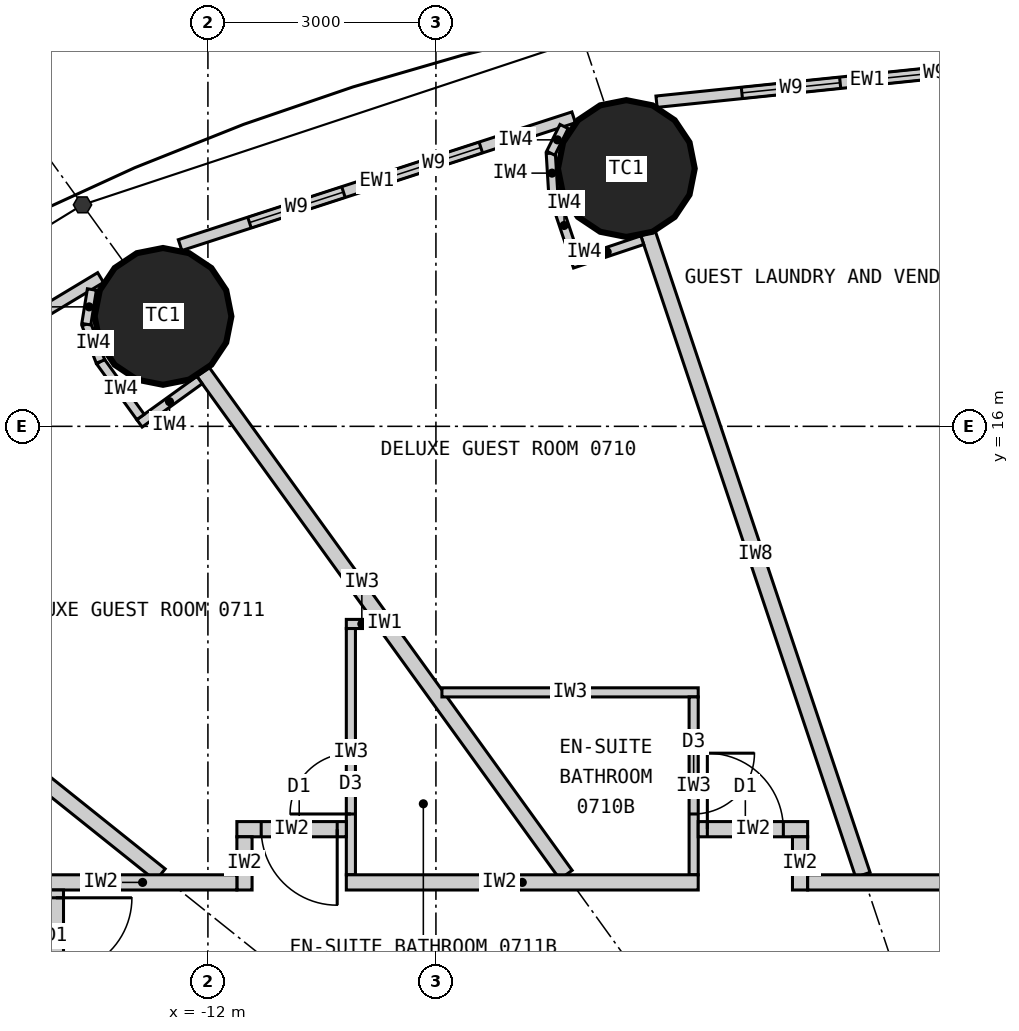
"""IFC4 building model, lengths in metres.
Left out: names, types, materials, properties, quantities, classifications, styles, units other than length and angle.
Written with IfcOpenShell. Run it as: python <this file> out.ifc"""

import sys

from ifc_helpers import new_model, si_unit, direction, frame, frame_2d, origin, origin_2d, place, context, subcontext, project, spatial, rectangle, circle, extrude, element, fill, save


model = new_model("IFC4")
c1 = context("Model", 3, precision=1e-05, world=origin(), true_north=direction((0.0, 1.0)))
c2 = subcontext(c1, "Body", "Model", "MODEL_VIEW")
j1 = project(units=[si_unit("LENGTHUNIT", "METRE"), si_unit("PLANEANGLEUNIT", "RADIAN")], contexts=[c1])
p1 = place(None, origin())
s1 = spatial("IfcSite", under=j1, at=p1, CompositionType="ELEMENT")
p2 = place(p1, origin())
s2 = spatial("IfcBuilding", under=s1, at=p2, CompositionType="ELEMENT")
p3 = place(p2, frame((0.0, 0.0, 36.0)))
s3 = spatial("IfcBuildingStorey", under=s2, at=p3, CompositionType="ELEMENT", Elevation=36.0)
for number, where, z_axis, x_axis in (
    (1, (-6.495, 19.391, 0.0), (0.0, 0.0, 1.0), (1.0, 0.0, 0.0)),
    (2, (-12.591, 17.447, 0.0), (0.0, 0.0, 1.0), (1.0, 0.0, 0.0)),
):
    element("IfcColumn", number, at=place(p3, frame(where, z_axis=z_axis, x_axis=x_axis)), inside=s3, PredefinedType="COLUMN", context=c2, shape_type="SweptSolid", body=[
        extrude(circle(Radius=0.9, at=origin_2d()), origin(), (0.0, 0.0, 1.0), 3.3),
    ])
p4 = place(p3, frame((-0.551, 20.843, 0.0), z_axis=(0.0, 0.0, 1.0), x_axis=(-0.994723735084, -0.102589915983, 0.0)))
e3 = element("IfcWall", 3, at=p4, inside=s3, PredefinedType="ELEMENTEDWALL", context=c2, shape_type="SweptSolid", body=[
    extrude(rectangle(XDim=5.576, YDim=0.15, at=frame_2d((2.788, 0.0))), origin(), (0.0, 0.0, 1.0), 3.12),
])
p5 = place(p4, frame((1.247, 0.0, 0.9)))
e4 = element("IfcOpeningElement", 4, at=p5, cuts=e3, PredefinedType="OPENING", context=c2, shape_type="SweptSolid", body=[
    extrude(rectangle(XDim=1.3, YDim=1.9, at=frame_2d((0.65, 0.95))), frame((0.0, 0.085, 0.0), z_axis=(0.0, -1.0, 0.0), x_axis=(1.0, 0.0, 0.0)), (0.0, 0.0, 1.0), 0.17),
])
p6 = place(p4, frame((3.147, 0.0, 0.9)))
e5 = element("IfcOpeningElement", 5, at=p6, cuts=e3, PredefinedType="OPENING", context=c2, shape_type="SweptSolid", body=[
    extrude(rectangle(XDim=1.3, YDim=1.9, at=frame_2d((0.65, 0.95))), frame((0.0, 0.085, 0.0), z_axis=(0.0, -1.0, 0.0), x_axis=(1.0, 0.0, 0.0)), (0.0, 0.0, 1.0), 0.17),
])
p7 = place(p3, frame((-7.188, 20.065, 0.0), z_axis=(0.0, 0.0, 1.0), x_axis=(-0.951138486029, -0.308764603532, 0.0)))
e6 = element("IfcWall", 6, at=p7, inside=s3, PredefinedType="ELEMENTEDWALL", context=c2, shape_type="SweptSolid", body=[
    extrude(rectangle(XDim=5.444, YDim=0.15, at=frame_2d((2.722, 0.0))), origin(), (0.0, 0.0, 1.0), 3.12),
])
p8 = place(p7, frame((1.284, 0.0, 0.9)))
e7 = element("IfcOpeningElement", 7, at=p8, cuts=e6, PredefinedType="OPENING", context=c2, shape_type="SweptSolid", body=[
    extrude(rectangle(XDim=1.3, YDim=1.9, at=frame_2d((0.65, 0.95))), frame((0.0, 0.085, 0.0), z_axis=(0.0, -1.0, 0.0), x_axis=(1.0, 0.0, 0.0)), (0.0, 0.0, 1.0), 0.17),
])
p9 = place(p7, frame((3.184, 0.0, 0.9)))
e8 = element("IfcOpeningElement", 8, at=p9, cuts=e6, PredefinedType="OPENING", context=c2, shape_type="SweptSolid", body=[
    extrude(rectangle(XDim=1.3, YDim=1.9, at=frame_2d((0.65, 0.95))), frame((0.0, 0.085, 0.0), z_axis=(0.0, -1.0, 0.0), x_axis=(1.0, 0.0, 0.0)), (0.0, 0.0, 1.0), 0.17),
])
p10 = place(p3, frame((-13.412, 17.957, 0.0), z_axis=(0.0, 0.0, 1.0), x_axis=(-0.856958191554, -0.515385931054, 0.0)))
e9 = element("IfcWall", 9, at=p10, inside=s3, PredefinedType="ELEMENTEDWALL", context=c2, shape_type="SweptSolid", body=[
    extrude(rectangle(XDim=5.201, YDim=0.15, at=frame_2d((2.601, 0.0))), origin(), (0.0, 0.0, 1.0), 3.12),
])
p11 = place(p10, frame((1.225, 0.0, 0.9)))
e10 = element("IfcOpeningElement", 10, at=p11, cuts=e9, PredefinedType="OPENING", context=c2, shape_type="SweptSolid", body=[
    extrude(rectangle(XDim=1.3, YDim=1.9, at=frame_2d((0.65, 0.95))), frame((0.0, 0.085, 0.0), z_axis=(0.0, -1.0, 0.0), x_axis=(1.0, 0.0, 0.0)), (0.0, 0.0, 1.0), 0.17),
])
p12 = place(p10, frame((3.125, 0.0, 0.9)))
e11 = element("IfcOpeningElement", 11, at=p12, cuts=e9, PredefinedType="OPENING", context=c2, shape_type="SweptSolid", body=[
    extrude(rectangle(XDim=1.3, YDim=1.9, at=frame_2d((0.65, 0.95))), frame((0.0, 0.085, 0.0), z_axis=(0.0, -1.0, 0.0), x_axis=(1.0, 0.0, 0.0)), (0.0, 0.0, 1.0), 0.17),
])
p13 = place(p3, frame((-3.383, 10.1, 0.0), z_axis=(0.0, 0.0, 1.0), x_axis=(-0.317593727596, 0.948226884344, 0.0)))
e12 = element("IfcWall", 12, at=p13, inside=s3, PredefinedType="PARTITIONING", context=c2, shape_type="SweptSolid", body=[
    extrude(rectangle(XDim=8.899, YDim=0.2, at=frame_2d((4.449, 0.0))), origin(), (0.0, 0.0, 1.0), 2.32),
])
p14 = place(p3, frame((-7.289, 10.1, 0.0), z_axis=(0.0, 0.0, 1.0), x_axis=(-0.585216319319, 0.810877216108, 0.0)))
e13 = element("IfcWall", 13, at=p14, inside=s3, PredefinedType="PARTITIONING", context=c2, shape_type="SweptSolid", body=[
    extrude(rectangle(XDim=8.16, YDim=0.2, at=frame_2d((4.08, 0.0))), origin(), (0.0, 0.0, 1.0), 2.32),
])
p15 = place(p3, frame((-12.625, 10.1, 0.0), z_axis=(0.0, 0.0, 1.0), x_axis=(-0.780872884676, 0.624689953479, 0.0)))
e14 = element("IfcWall", 14, at=p15, inside=s3, PredefinedType="PARTITIONING", context=c2, shape_type="SweptSolid", body=[
    extrude(rectangle(XDim=5.845, YDim=0.2, at=frame_2d((2.922, 0.0))), origin(), (0.0, 0.0, 1.0), 2.32),
])
p16 = place(p3, frame((-8.921, 12.5, 0.0), z_axis=(0.0, 0.0, 1.0), x_axis=(1.0, 0.0, 0.0)))
e15 = element("IfcWall", 15, at=p16, inside=s3, PredefinedType="PARTITIONING", context=c2, shape_type="SweptSolid", body=[
    extrude(rectangle(XDim=3.372, YDim=0.12, at=frame_2d((1.686, 0.0))), origin(), (0.0, 0.0, 1.0), 3.12),
])
p17 = place(p3, frame((-5.609, 10.1, 0.0), z_axis=(0.0, 0.0, 1.0), x_axis=(0.0, 1.0, 0.0)))
e16 = element("IfcWall", 16, at=p17, inside=s3, PredefinedType="PARTITIONING", context=c2, shape_type="SweptSolid", body=[
    extrude(rectangle(XDim=2.34, YDim=0.12, at=frame_2d((1.17, 0.0))), origin(), (0.0, 0.0, 1.0), 3.12),
])
p18 = place(p17, frame((0.8, 0.0, 0.0)))
e17 = element("IfcOpeningElement", 17, at=p18, cuts=e16, PredefinedType="OPENING", context=c2, shape_type="SweptSolid", body=[
    extrude(rectangle(XDim=0.8, YDim=2.1, at=frame_2d((0.4, 1.05))), frame((0.0, 0.07, 0.0), z_axis=(0.0, -1.0, 0.0), x_axis=(1.0, 0.0, 0.0)), (0.0, 0.0, 1.0), 0.14),
])
p19 = place(p3, frame((-9.771, 13.4, 0.0), z_axis=(0.0, 0.0, 1.0), x_axis=(-1.0, 0.0, 0.0)))
e18 = element("IfcWall", 18, at=p19, inside=s3, PredefinedType="PARTITIONING", context=c2, shape_type="SweptSolid", body=[
    extrude(rectangle(XDim=0.408, YDim=0.12, at=frame_2d((0.204, 0.0))), origin(), (0.0, 0.0, 1.0), 3.12),
])
p20 = place(p3, frame((-10.119, 10.1, 0.0), z_axis=(0.0, 0.0, 1.0), x_axis=(0.0, 1.0, 0.0)))
e19 = element("IfcWall", 19, at=p20, inside=s3, PredefinedType="PARTITIONING", context=c2, shape_type="SweptSolid", body=[
    extrude(rectangle(XDim=3.24, YDim=0.12, at=frame_2d((1.62, 0.0))), origin(), (0.0, 0.0, 1.0), 3.12),
])
p21 = place(p20, frame((0.8, 0.0, 0.0)))
e20 = element("IfcOpeningElement", 20, at=p21, cuts=e19, PredefinedType="OPENING", context=c2, shape_type="SweptSolid", body=[
    extrude(rectangle(XDim=0.8, YDim=2.1, at=frame_2d((0.4, 1.05))), frame((0.0, 0.07, 0.0), z_axis=(0.0, -1.0, 0.0), x_axis=(1.0, 0.0, 0.0)), (0.0, 0.0, 1.0), 0.14),
])
p22 = place(p3, frame((-5.549, 10.7, 0.0), z_axis=(0.0, 0.0, 1.0), x_axis=(1.0, 0.0, 0.0)))
e21 = element("IfcWall", 21, at=p22, inside=s3, PredefinedType="PARTITIONING", context=c2, shape_type="SweptSolid", body=[
    extrude(rectangle(XDim=1.44, YDim=0.2, at=frame_2d((0.72, 0.0))), origin(), (0.0, 0.0, 1.0), 3.12),
])
p23 = place(p22, frame((0.12, 0.0, 0.0)))
e22 = element("IfcOpeningElement", 22, at=p23, cuts=e21, PredefinedType="OPENING", context=c2, shape_type="SweptSolid", body=[
    extrude(rectangle(XDim=1.0, YDim=2.2, at=frame_2d((0.5, 1.1))), frame((0.0, 0.11, 0.0), z_axis=(0.0, -1.0, 0.0), x_axis=(1.0, 0.0, 0.0)), (0.0, 0.0, 1.0), 0.22),
])
p24 = place(p3, frame((-4.209, 9.9, 0.0), z_axis=(0.0, 0.0, 1.0), x_axis=(0.0, 1.0, 0.0)))
e23 = element("IfcWall", 23, at=p24, inside=s3, PredefinedType="PARTITIONING", context=c2, shape_type="SweptSolid", body=[
    extrude(rectangle(XDim=0.7, YDim=0.2, at=frame_2d((0.35, 0.0))), origin(), (0.0, 0.0, 1.0), 3.12),
])
p25 = place(p3, frame((-11.619, 10.7, 0.0), z_axis=(0.0, 0.0, 1.0), x_axis=(1.0, 0.0, 0.0)))
e24 = element("IfcWall", 24, at=p25, inside=s3, PredefinedType="PARTITIONING", context=c2, shape_type="SweptSolid", body=[
    extrude(rectangle(XDim=1.44, YDim=0.2, at=frame_2d((0.72, 0.0))), origin(), (0.0, 0.0, 1.0), 3.12),
])
p26 = place(p25, frame((0.32, 0.0, 0.0)))
e25 = element("IfcOpeningElement", 25, at=p26, cuts=e24, PredefinedType="OPENING", context=c2, shape_type="SweptSolid", body=[
    extrude(rectangle(XDim=1.0, YDim=2.2, at=frame_2d((0.5, 1.1))), frame((0.0, 0.11, 0.0), z_axis=(0.0, -1.0, 0.0), x_axis=(1.0, 0.0, 0.0)), (0.0, 0.0, 1.0), 0.22),
])
p27 = place(p3, frame((-11.519, 9.9, 0.0), z_axis=(0.0, 0.0, 1.0), x_axis=(0.0, 1.0, 0.0)))
e26 = element("IfcWall", 26, at=p27, inside=s3, PredefinedType="PARTITIONING", context=c2, shape_type="SweptSolid", body=[
    extrude(rectangle(XDim=0.7, YDim=0.2, at=frame_2d((0.35, 0.0))), origin(), (0.0, 0.0, 1.0), 3.12),
])
p28 = place(p3, frame((-14.1, 10.0, 0.0), z_axis=(0.0, 0.0, 1.0), x_axis=(1.0, 0.0, 0.0)))
e27 = element("IfcWall", 27, at=p28, inside=s3, PredefinedType="PARTITIONING", context=c2, shape_type="SweptSolid", body=[
    extrude(rectangle(XDim=2.481, YDim=0.2, at=frame_2d((1.24, 0.0))), origin(), (0.0, 0.0, 1.0), 3.12),
])
p29 = place(p3, frame((-10.179, 10.0, 0.0), z_axis=(0.0, 0.0, 1.0), x_axis=(1.0, 0.0, 0.0)))
e28 = element("IfcWall", 28, at=p29, inside=s3, PredefinedType="PARTITIONING", context=c2, shape_type="SweptSolid", body=[
    extrude(rectangle(XDim=4.63, YDim=0.2, at=frame_2d((2.315, 0.0))), origin(), (0.0, 0.0, 1.0), 3.12),
])
p30 = place(p3, frame((-4.109, 10.0, 0.0), z_axis=(0.0, 0.0, 1.0), x_axis=(1.0, 0.0, 0.0)))
e29 = element("IfcWall", 29, at=p30, inside=s3, PredefinedType="PARTITIONING", context=c2, shape_type="SweptSolid", body=[
    extrude(rectangle(XDim=4.312, YDim=0.2, at=frame_2d((2.156, 0.0))), origin(), (0.0, 0.0, 1.0), 3.12),
])
p31 = place(p30, frame((2.689, 0.0, 0.0)))
e30 = element("IfcOpeningElement", 30, at=p31, cuts=e29, PredefinedType="OPENING", context=c2, shape_type="SweptSolid", body=[
    extrude(rectangle(XDim=1.0, YDim=2.2, at=frame_2d((0.5, 1.1))), frame((0.0, 0.11, 0.0), z_axis=(0.0, -1.0, 0.0), x_axis=(1.0, 0.0, 0.0)), (0.0, 0.0, 1.0), 0.22),
])
p32 = place(p3, frame((-14.0, 9.9, 0.0), z_axis=(0.0, 0.0, 1.0), x_axis=(0.0, -1.0, 0.0)))
e31 = element("IfcWall", 31, at=p32, inside=s3, PredefinedType="PARTITIONING", context=c2, shape_type="SweptSolid", body=[
    extrude(rectangle(XDim=5.127, YDim=0.2, at=frame_2d((2.564, 0.0))), origin(), (0.0, 0.0, 1.0), 3.12),
])
p33 = place(p32, frame((0.103, 0.0, 0.0)))
e32 = element("IfcOpeningElement", 32, at=p33, cuts=e31, PredefinedType="OPENING", context=c2, shape_type="SweptSolid", body=[
    extrude(rectangle(XDim=1.0, YDim=2.2, at=frame_2d((0.5, 1.1))), frame((0.0, 0.11, 0.0), z_axis=(0.0, -1.0, 0.0), x_axis=(1.0, 0.0, 0.0)), (0.0, 0.0, 1.0), 0.22),
])
p34 = place(p3, frame((-6.285, 18.449, 0.0), z_axis=(0.0, 0.0, 1.0), x_axis=(-0.948281677008, -0.317430088446, 0.0)))
e33 = element("IfcWall", 33, at=p34, inside=s3, PredefinedType="PARTITIONING", context=c2, shape_type="SweptSolid", body=[
    extrude(rectangle(XDim=0.974, YDim=0.12, at=frame_2d((0.487, 0.0))), origin(), (0.0, 0.0, 1.0), 3.12),
])
p35 = place(p3, frame((-7.171, 18.216, 0.0), z_axis=(0.0, 0.0, 1.0), x_axis=(-0.317692409458, 0.94819382669, 0.0)))
e34 = element("IfcWall", 34, at=p35, inside=s3, PredefinedType="PARTITIONING", context=c2, shape_type="SweptSolid", body=[
    extrude(rectangle(XDim=0.9, YDim=0.12, at=frame_2d((0.45, 0.0))), origin(), (0.0, 0.0, 1.0), 3.12),
])
p36 = place(p3, frame((-7.457, 19.069, 0.0), z_axis=(0.0, 0.0, 1.0), x_axis=(-0.061365267648, 0.99811537606, 0.0)))
e35 = element("IfcWall", 35, at=p36, inside=s3, PredefinedType="PARTITIONING", context=c2, shape_type="SweptSolid", body=[
    extrude(rectangle(XDim=0.525, YDim=0.12, at=frame_2d((0.263, 0.0))), origin(), (0.0, 0.0, 1.0), 3.12),
])
p37 = place(p3, frame((-7.489, 19.593, 0.0), z_axis=(0.0, 0.0, 1.0), x_axis=(0.446218959337, 0.89492381817, 0.0)))
e36 = element("IfcWall", 36, at=p37, inside=s3, PredefinedType="PARTITIONING", context=c2, shape_type="SweptSolid", body=[
    extrude(rectangle(XDim=0.393, YDim=0.12, at=frame_2d((0.196, 0.0))), origin(), (0.0, 0.0, 1.0), 3.12),
])
p38 = place(p3, frame((-12.11, 16.609, 0.0), z_axis=(0.0, 0.0, 1.0), x_axis=(-0.810897160646, -0.585188683123, 0.0)))
e37 = element("IfcWall", 37, at=p38, inside=s3, PredefinedType="PARTITIONING", context=c2, shape_type="SweptSolid", body=[
    extrude(rectangle(XDim=0.975, YDim=0.12, at=frame_2d((0.487, 0.0))), origin(), (0.0, 0.0, 1.0), 3.12),
])
p39 = place(p3, frame((-12.887, 16.123, 0.0), z_axis=(0.0, 0.0, 1.0), x_axis=(-0.585054732094, 0.810993810367, 0.0)))
e38 = element("IfcWall", 38, at=p39, inside=s3, PredefinedType="PARTITIONING", context=c2, shape_type="SweptSolid", body=[
    extrude(rectangle(XDim=0.9, YDim=0.12, at=frame_2d((0.45, 0.0))), origin(), (0.0, 0.0, 1.0), 3.12),
])
p40 = place(p3, frame((-13.414, 16.853, 0.0), z_axis=(0.0, 0.0, 1.0), x_axis=(-0.355705277023, 0.934598178844, 0.0)))
e39 = element("IfcWall", 39, at=p40, inside=s3, PredefinedType="PARTITIONING", context=c2, shape_type="SweptSolid", body=[
    extrude(rectangle(XDim=0.525, YDim=0.12, at=frame_2d((0.263, 0.0))), origin(), (0.0, 0.0, 1.0), 3.12),
])
p41 = place(p3, frame((-13.6, 17.344, 0.0), z_axis=(0.0, 0.0, 1.0), x_axis=(0.15994604532, 0.987125758243, 0.0)))
e40 = element("IfcWall", 40, at=p41, inside=s3, PredefinedType="PARTITIONING", context=c2, shape_type="SweptSolid", body=[
    extrude(rectangle(XDim=0.462, YDim=0.12, at=frame_2d((0.231, 0.0))), origin(), (0.0, 0.0, 1.0), 3.12),
])
p42 = place(p5, origin())
e41 = element("IfcWindow", 41, at=p42, inside=s3, PartitioningType="SINGLE_PANEL", PredefinedType="WINDOW", context=c2, shape_type="SweptSolid", body=[
    extrude(rectangle(XDim=1.3, YDim=1.9, at=frame_2d((0.65, 0.95))), frame((0.0, 0.03, 0.0), z_axis=(0.0, -1.0, 0.0), x_axis=(1.0, 0.0, 0.0)), (0.0, 0.0, 1.0), 0.06),
])
fill(e4, e41)
p43 = place(p6, origin())
e42 = element("IfcWindow", 42, at=p43, inside=s3, PartitioningType="SINGLE_PANEL", PredefinedType="WINDOW", context=c2, shape_type="SweptSolid", body=[
    extrude(rectangle(XDim=1.3, YDim=1.9, at=frame_2d((0.65, 0.95))), frame((0.0, 0.03, 0.0), z_axis=(0.0, -1.0, 0.0), x_axis=(1.0, 0.0, 0.0)), (0.0, 0.0, 1.0), 0.06),
])
fill(e5, e42)
p44 = place(p8, origin())
e43 = element("IfcWindow", 43, at=p44, inside=s3, PartitioningType="SINGLE_PANEL", PredefinedType="WINDOW", context=c2, shape_type="SweptSolid", body=[
    extrude(rectangle(XDim=1.3, YDim=1.9, at=frame_2d((0.65, 0.95))), frame((0.0, 0.03, 0.0), z_axis=(0.0, -1.0, 0.0), x_axis=(1.0, 0.0, 0.0)), (0.0, 0.0, 1.0), 0.06),
])
fill(e7, e43)
p45 = place(p9, origin())
e44 = element("IfcWindow", 44, at=p45, inside=s3, PartitioningType="SINGLE_PANEL", PredefinedType="WINDOW", context=c2, shape_type="SweptSolid", body=[
    extrude(rectangle(XDim=1.3, YDim=1.9, at=frame_2d((0.65, 0.95))), frame((0.0, 0.03, 0.0), z_axis=(0.0, -1.0, 0.0), x_axis=(1.0, 0.0, 0.0)), (0.0, 0.0, 1.0), 0.06),
])
fill(e8, e44)
p46 = place(p18, origin())
e45 = element("IfcDoor", 45, at=p46, inside=s3, OperationType="SINGLE_SWING_RIGHT", PredefinedType="DOOR", context=c2, shape_type="SweptSolid", body=[
    extrude(rectangle(XDim=0.8, YDim=2.1, at=frame_2d((0.4, 1.05))), frame((0.0, 0.025, 0.0), z_axis=(0.0, -1.0, 0.0), x_axis=(1.0, 0.0, 0.0)), (0.0, 0.0, 1.0), 0.05),
])
fill(e17, e45)
p47 = place(p23, origin())
e46 = element("IfcDoor", 46, at=p47, inside=s3, OperationType="SINGLE_SWING_LEFT", PredefinedType="DOOR", context=c2, shape_type="SweptSolid", body=[
    extrude(rectangle(XDim=1.0, YDim=2.2, at=frame_2d((0.5, 1.1))), frame((0.0, 0.025, 0.0), z_axis=(0.0, -1.0, 0.0), x_axis=(1.0, 0.0, 0.0)), (0.0, 0.0, 1.0), 0.05),
])
fill(e22, e46)
p48 = place(p21, origin())
e47 = element("IfcDoor", 47, at=p48, inside=s3, OperationType="SINGLE_SWING_LEFT", PredefinedType="DOOR", context=c2, shape_type="SweptSolid", body=[
    extrude(rectangle(XDim=0.8, YDim=2.1, at=frame_2d((0.4, 1.05))), frame((0.0, 0.025, 0.0), z_axis=(0.0, -1.0, 0.0), x_axis=(1.0, 0.0, 0.0)), (0.0, 0.0, 1.0), 0.05),
])
fill(e20, e47)
p49 = place(p26, origin())
e48 = element("IfcDoor", 48, at=p49, inside=s3, OperationType="SINGLE_SWING_RIGHT", PredefinedType="DOOR", context=c2, shape_type="SweptSolid", body=[
    extrude(rectangle(XDim=1.0, YDim=2.2, at=frame_2d((0.5, 1.1))), frame((0.0, 0.025, 0.0), z_axis=(0.0, -1.0, 0.0), x_axis=(1.0, 0.0, 0.0)), (0.0, 0.0, 1.0), 0.05),
])
fill(e25, e48)
p50 = place(p33, origin())
e49 = element("IfcDoor", 49, at=p50, inside=s3, OperationType="SINGLE_SWING_LEFT", PredefinedType="DOOR", context=c2, shape_type="SweptSolid", body=[
    extrude(rectangle(XDim=1.0, YDim=2.2, at=frame_2d((0.5, 1.1))), frame((0.0, 0.025, 0.0), z_axis=(0.0, -1.0, 0.0), x_axis=(1.0, 0.0, 0.0)), (0.0, 0.0, 1.0), 0.05),
])
fill(e32, e49)
save(model, sys.argv[1])
